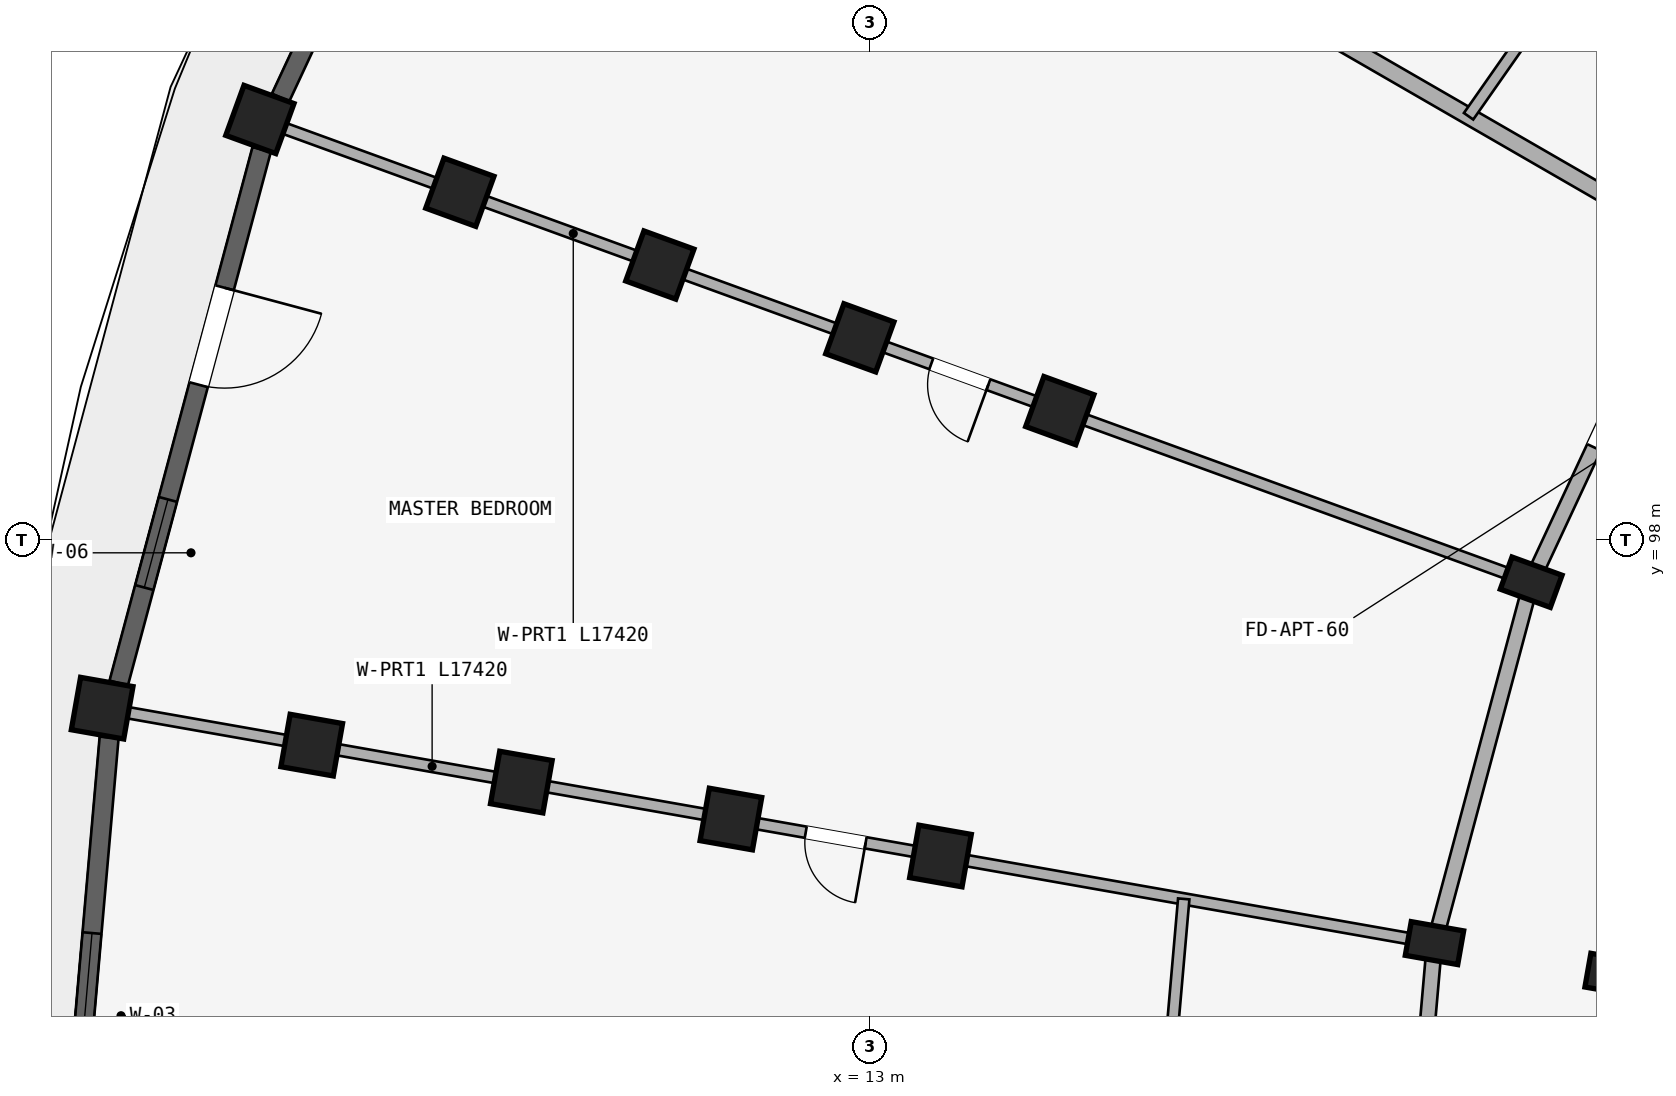
"""IFC4 building model, lengths in metres.
Left out: names, types, materials, properties, quantities, classifications, styles, units other than length and angle.
Written with IfcOpenShell. Run it as: python <this file> out.ifc"""

import sys

from ifc_helpers import new_model, si_unit, direction, frame, frame_2d, origin, origin_2d, place, context, subcontext, project, spatial, rectangle, extrude, element, fill, save


model = new_model("IFC4")
c1 = context("Model", 3, precision=1e-05, world=origin(), true_north=direction((0.0, 1.0)))
c2 = subcontext(c1, "Body", "Model", "MODEL_VIEW")
j1 = project(units=[si_unit("LENGTHUNIT", "METRE"), si_unit("PLANEANGLEUNIT", "RADIAN")], contexts=[c1])
p1 = place(None, origin())
s1 = spatial("IfcSite", under=j1, at=p1, CompositionType="ELEMENT")
p2 = place(p1, origin())
s2 = spatial("IfcBuilding", under=s1, at=p2, CompositionType="ELEMENT")
p3 = place(p2, frame((0.0, 0.0, 24.45)))
s3 = spatial("IfcBuildingStorey", under=s2, at=p3, CompositionType="ELEMENT", Elevation=24.45)
p4 = place(p3, frame((21.701, 97.445, 0.0), z_axis=(0.0, 0.0, 1.0), x_axis=(0.342020143326, 0.939692620786, 0.0)))
e1 = element("IfcColumn", 1, at=p4, inside=s3, PredefinedType="COLUMN", context=c2, shape_type="SweptSolid", body=[
    extrude(rectangle(XDim=0.45, YDim=0.7, at=origin_2d()), origin(), (0.0, 0.0, 1.0), 2.93),
])
for number, where, z_axis, x_axis in (
    (2, (15.499, 99.702, 0.0), (0.0, 0.0, 1.0), (0.342, 0.94, 0.0)),
    (3, (12.868, 100.66, 0.0), (0.0, 0.0, 1.0), (0.342, 0.94, 0.0)),
    (4, (10.236, 101.618, 0.0), (0.0, 0.0, 1.0), (0.342, 0.94, 0.0)),
    (5, (7.605, 102.575, 0.0), (0.0, 0.0, 1.0), (0.342, 0.94, 0.0)),
    (6, (4.974, 103.533, 0.0), (0.0, 0.0, 1.0), (0.342, 0.94, 0.0)),
):
    element("IfcColumn", number, at=place(p3, frame(where, z_axis=z_axis, x_axis=x_axis)), inside=s3, PredefinedType="COLUMN", context=c2, shape_type="SweptSolid", body=[
        extrude(rectangle(XDim=0.7, YDim=0.7, at=origin_2d()), origin(), (0.0, 0.0, 1.0), 2.93),
    ])
for number, where, z_axis, x_axis in (
    (7, (22.792, 92.28, 0.0), (0.0, 0.0, 1.0), (0.174, 0.985, 0.0)),
    (8, (20.428, 92.697, 0.0), (0.0, 0.0, 1.0), (0.174, 0.985, 0.0)),
):
    element("IfcColumn", number, at=place(p3, frame(where, z_axis=z_axis, x_axis=x_axis)), inside=s3, PredefinedType="COLUMN", context=c2, shape_type="SweptSolid", body=[
        extrude(rectangle(XDim=0.45, YDim=0.7, at=origin_2d()), origin(), (0.0, 0.0, 1.0), 2.93),
    ])
for number, where, z_axis, x_axis in (
    (9, (13.929, 93.843, 0.0), (0.0, 0.0, 1.0), (0.174, 0.985, 0.0)),
    (10, (11.171, 94.329, 0.0), (0.0, 0.0, 1.0), (0.174, 0.985, 0.0)),
    (11, (8.414, 94.815, 0.0), (0.0, 0.0, 1.0), (0.174, 0.985, 0.0)),
    (12, (5.656, 95.302, 0.0), (0.0, 0.0, 1.0), (0.174, 0.985, 0.0)),
    (13, (2.899, 95.788, 0.0), (0.0, 0.0, 1.0), (0.174, 0.985, 0.0)),
):
    element("IfcColumn", number, at=place(p3, frame(where, z_axis=z_axis, x_axis=x_axis)), inside=s3, PredefinedType="COLUMN", context=c2, shape_type="SweptSolid", body=[
        extrude(rectangle(XDim=0.7, YDim=0.7, at=origin_2d()), origin(), (0.0, 0.0, 1.0), 2.93),
    ])
p5 = place(p3, frame((23.778, 101.9, 0.0), z_axis=(0.0, 0.0, 1.0), x_axis=(-0.422629854778, -0.906302381024, 0.0)))
e14 = element("IfcWall", 14, at=p5, inside=s3, PredefinedType="STANDARD", context=c2, shape_type="SweptSolid", body=[
    extrude(rectangle(XDim=4.915, YDim=0.2, at=frame_2d((2.458, 0.0))), origin(), (0.0, 0.0, 1.0), 2.372),
])
p6 = place(p5, frame((1.958, 0.0, 0.0)))
e15 = element("IfcOpeningElement", 15, at=p6, cuts=e14, PredefinedType="OPENING", context=c2, shape_type="SweptSolid", body=[
    extrude(rectangle(XDim=1.0, YDim=2.15, at=frame_2d((0.5, 1.075))), frame((0.0, 0.11, 0.0), z_axis=(0.0, -1.0, 0.0), x_axis=(1.0, 0.0, 0.0)), (0.0, 0.0, 1.0), 0.22),
])
p7 = place(p3, frame((21.701, 97.445, 0.0), z_axis=(0.0, 0.0, 1.0), x_axis=(-0.258803112091, -0.965930095386, 0.0)))
e16 = element("IfcWall", 16, at=p7, inside=s3, PredefinedType="STANDARD", context=c2, shape_type="SweptSolid", body=[
    extrude(rectangle(XDim=4.916, YDim=0.2, at=frame_2d((2.458, 0.0))), origin(), (0.0, 0.0, 1.0), 2.372),
])
p8 = place(p3, frame((22.792, 92.28, 0.0), z_axis=(0.0, 0.0, 1.0), x_axis=(-0.087187153726, -0.996191949488, 0.0)))
e17 = element("IfcWall", 17, at=p8, inside=s3, PredefinedType="STANDARD", context=c2, shape_type="SweptSolid", body=[
    extrude(rectangle(XDim=4.497, YDim=0.2, at=frame_2d((2.249, 0.0))), origin(), (0.0, 0.0, 1.0), 2.372),
])
p9 = place(p3, frame((20.428, 92.697, 0.0), z_axis=(0.0, 0.0, 1.0), x_axis=(-0.087167566415, -0.996193663584, 0.0)))
e18 = element("IfcWall", 18, at=p9, inside=s3, PredefinedType="STANDARD", context=c2, shape_type="SweptSolid", body=[
    extrude(rectangle(XDim=4.916, YDim=0.2, at=frame_2d((2.458, 0.0))), origin(), (0.0, 0.0, 1.0), 2.372),
])
p10 = place(p3, frame((23.691, 101.95, 0.0), z_axis=(0.0, 0.0, 1.0), x_axis=(-0.866026648973, 0.499997843263, 0.0)))
e19 = element("IfcWall", 19, at=p10, inside=s3, PredefinedType="STANDARD", context=c2, shape_type="SweptSolid", body=[
    extrude(rectangle(XDim=17.42, YDim=0.22, at=frame_2d((8.71, 0.0))), origin(), (0.0, 0.0, 1.0), 2.372),
])
p11 = place(p3, frame((21.607, 97.479, 0.0), z_axis=(0.0, 0.0, 1.0), x_axis=(-0.939691901159, 0.342022120477, 0.0)))
e20 = element("IfcWall", 20, at=p11, inside=s3, PredefinedType="PARTITIONING", context=c2, shape_type="SweptSolid", body=[
    extrude(rectangle(XDim=17.42, YDim=0.15, at=frame_2d((8.71, 0.0))), origin(), (0.0, 0.0, 1.0), 2.372),
])
p12 = place(p11, frame((7.5, 0.0, 0.0)))
e21 = element("IfcOpeningElement", 21, at=p12, cuts=e20, PredefinedType="OPENING", context=c2, shape_type="SweptSolid", body=[
    extrude(rectangle(XDim=0.8, YDim=2.1, at=frame_2d((0.4, 1.05))), frame((0.0, 0.085, 0.0), z_axis=(0.0, -1.0, 0.0), x_axis=(1.0, 0.0, 0.0)), (0.0, 0.0, 1.0), 0.17),
])
p13 = place(p3, frame((20.33, 92.714, 0.0), z_axis=(0.0, 0.0, 1.0), x_axis=(-0.984808098809, 0.173646216546, 0.0)))
e22 = element("IfcWall", 22, at=p13, inside=s3, PredefinedType="PARTITIONING", context=c2, shape_type="SweptSolid", body=[
    extrude(rectangle(XDim=17.42, YDim=0.15, at=frame_2d((8.71, 0.0))), origin(), (0.0, 0.0, 1.0), 2.372),
])
p14 = place(p13, frame((7.5, 0.0, 0.0)))
e23 = element("IfcOpeningElement", 23, at=p14, cuts=e22, PredefinedType="OPENING", context=c2, shape_type="SweptSolid", body=[
    extrude(rectangle(XDim=0.8, YDim=2.1, at=frame_2d((0.4, 1.05))), frame((0.0, 0.085, 0.0), z_axis=(0.0, -1.0, 0.0), x_axis=(1.0, 0.0, 0.0)), (0.0, 0.0, 1.0), 0.17),
])
p15 = place(p3, frame((24.031, 108.08, 0.0), z_axis=(0.0, 0.0, 1.0), x_axis=(-0.573569599955, -0.819156831143, 0.0)))
e24 = element("IfcWall", 24, at=p15, inside=s3, PredefinedType="PLUMBINGWALL", context=c2, shape_type="SweptSolid", body=[
    extrude(rectangle(XDim=5.5, YDim=0.15, at=frame_2d((2.75, 0.0))), origin(), (0.0, 0.0, 1.0), 2.372),
])
p16 = place(p15, frame((2.35, 0.0, 0.0)))
e25 = element("IfcOpeningElement", 25, at=p16, cuts=e24, PredefinedType="OPENING", context=c2, shape_type="SweptSolid", body=[
    extrude(rectangle(XDim=0.8, YDim=2.1, at=frame_2d((0.4, 1.05))), frame((0.0, 0.085, 0.0), z_axis=(0.0, -1.0, 0.0), x_axis=(1.0, 0.0, 0.0)), (0.0, 0.0, 1.0), 0.17),
])
p17 = place(p3, frame((17.129, 93.279, 0.0), z_axis=(0.0, 0.0, 1.0), x_axis=(-0.087188978393, -0.996191789791, 0.0)))
e26 = element("IfcWall", 26, at=p17, inside=s3, PredefinedType="PLUMBINGWALL", context=c2, shape_type="SweptSolid", body=[
    extrude(rectangle(XDim=5.5, YDim=0.15, at=frame_2d((2.75, 0.0))), origin(), (0.0, 0.0, 1.0), 2.372),
])
p18 = place(p17, frame((2.35, 0.0, 0.0)))
e27 = element("IfcOpeningElement", 27, at=p18, cuts=e26, PredefinedType="OPENING", context=c2, shape_type="SweptSolid", body=[
    extrude(rectangle(XDim=0.8, YDim=2.1, at=frame_2d((0.4, 1.05))), frame((0.0, 0.085, 0.0), z_axis=(0.0, -1.0, 0.0), x_axis=(1.0, 0.0, 0.0)), (0.0, 0.0, 1.0), 0.17),
])
p19 = place(p3, frame((8.317, 110.406, 0.0), z_axis=(0.0, 0.0, 1.0), x_axis=(-0.422627946127, -0.90630327107, 0.0)))
e28 = element("IfcWall", 28, at=p19, inside=s3, PredefinedType="STANDARD", context=c2, shape_type="SweptSolid", body=[
    extrude(rectangle(XDim=7.267, YDim=0.25, at=frame_2d((3.633, 0.0))), origin(), (0.0, 0.0, 1.0), 2.372),
])
p20 = place(p19, frame((2.808, 0.0, 0.422)))
e29 = element("IfcOpeningElement", 29, at=p20, cuts=e28, PredefinedType="OPENING", context=c2, shape_type="SweptSolid", body=[
    extrude(rectangle(XDim=1.65, YDim=1.75, at=frame_2d((0.825, 0.875))), frame((0.0, 0.135, 0.0), z_axis=(0.0, -1.0, 0.0), x_axis=(1.0, 0.0, 0.0)), (0.0, 0.0, 1.0), 0.27),
])
p21 = place(p3, frame((4.998, 103.137, 0.0), z_axis=(0.0, 0.0, 1.0), x_axis=(-0.258802140196, -0.965930355787, 0.0)))
e30 = element("IfcWall", 30, at=p21, inside=s3, PredefinedType="STANDARD", context=c2, shape_type="SweptSolid", body=[
    extrude(rectangle(XDim=7.267, YDim=0.25, at=frame_2d((3.633, 0.0))), origin(), (0.0, 0.0, 1.0), 2.372),
])
p22 = place(p21, frame((4.766, 0.0, 0.522)))
e31 = element("IfcOpeningElement", 31, at=p22, cuts=e30, PredefinedType="OPENING", context=c2, shape_type="SweptSolid", body=[
    extrude(rectangle(XDim=1.2, YDim=1.5, at=frame_2d((0.6, 0.75))), frame((0.0, 0.135, 0.0), z_axis=(0.0, -1.0, 0.0), x_axis=(1.0, 0.0, 0.0)), (0.0, 0.0, 1.0), 0.27),
])
p23 = place(p21, frame((1.883, 0.0, 0.0)))
e32 = element("IfcOpeningElement", 32, at=p23, cuts=e30, PredefinedType="OPENING", context=c2, shape_type="SweptSolid", body=[
    extrude(rectangle(XDim=1.32, YDim=2.15, at=frame_2d((0.66, 1.075))), frame((0.0, 0.135, 0.0), z_axis=(0.0, -1.0, 0.0), x_axis=(1.0, 0.0, 0.0)), (0.0, 0.0, 1.0), 0.27),
])
p24 = place(p3, frame((2.991, 95.403, 0.0), z_axis=(0.0, 0.0, 1.0), x_axis=(-0.08718487158, -0.99619214922, 0.0)))
e33 = element("IfcWall", 33, at=p24, inside=s3, PredefinedType="STANDARD", context=c2, shape_type="SweptSolid", body=[
    extrude(rectangle(XDim=7.267, YDim=0.25, at=frame_2d((3.633, 0.0))), origin(), (0.0, 0.0, 1.0), 2.372),
])
p25 = place(p24, frame((2.583, 0.0, 0.372)))
e34 = element("IfcOpeningElement", 34, at=p25, cuts=e33, PredefinedType="OPENING", context=c2, shape_type="SweptSolid", body=[
    extrude(rectangle(XDim=2.1, YDim=1.8, at=frame_2d((1.05, 0.9))), frame((0.0, 0.135, 0.0), z_axis=(0.0, -1.0, 0.0), x_axis=(1.0, 0.0, 0.0)), (0.0, 0.0, 1.0), 0.27),
])
p26 = place(p22, origin())
e35 = element("IfcWindow", 35, at=p26, inside=s3, PartitioningType="SINGLE_PANEL", PredefinedType="WINDOW", context=c2, shape_type="SweptSolid", body=[
    extrude(rectangle(XDim=1.2, YDim=1.5, at=frame_2d((0.6, 0.75))), frame((0.0, 0.03, 0.0), z_axis=(0.0, -1.0, 0.0), x_axis=(1.0, 0.0, 0.0)), (0.0, 0.0, 1.0), 0.06),
])
fill(e31, e35)
p27 = place(p25, origin())
e36 = element("IfcWindow", 36, at=p27, inside=s3, PartitioningType="TRIPLE_PANEL_VERTICAL", PredefinedType="WINDOW", context=c2, shape_type="SweptSolid", body=[
    extrude(rectangle(XDim=2.1, YDim=1.8, at=frame_2d((1.05, 0.9))), frame((0.0, 0.03, 0.0), z_axis=(0.0, -1.0, 0.0), x_axis=(1.0, 0.0, 0.0)), (0.0, 0.0, 1.0), 0.06),
])
fill(e34, e36)
p28 = place(p12, origin())
e37 = element("IfcDoor", 37, at=p28, inside=s3, OperationType="SINGLE_SWING_LEFT", PredefinedType="DOOR", context=c2, shape_type="SweptSolid", body=[
    extrude(rectangle(XDim=0.8, YDim=2.1, at=frame_2d((0.4, 1.05))), frame((0.0, 0.025, 0.0), z_axis=(0.0, -1.0, 0.0), x_axis=(1.0, 0.0, 0.0)), (0.0, 0.0, 1.0), 0.05),
])
fill(e21, e37)
p29 = place(p14, origin())
e38 = element("IfcDoor", 38, at=p29, inside=s3, OperationType="SINGLE_SWING_LEFT", PredefinedType="DOOR", context=c2, shape_type="SweptSolid", body=[
    extrude(rectangle(XDim=0.8, YDim=2.1, at=frame_2d((0.4, 1.05))), frame((0.0, 0.025, 0.0), z_axis=(0.0, -1.0, 0.0), x_axis=(1.0, 0.0, 0.0)), (0.0, 0.0, 1.0), 0.05),
])
fill(e23, e38)
p30 = place(p6, frame((1.0, 0.0, 0.0), z_axis=(0.0, 0.0, 1.0), x_axis=(-1.0, 0.0, 0.0)))
e39 = element("IfcDoor", 39, at=p30, inside=s3, OperationType="SINGLE_SWING_RIGHT", PredefinedType="DOOR", context=c2, shape_type="SweptSolid", body=[
    extrude(rectangle(XDim=1.0, YDim=2.15, at=frame_2d((0.5, 1.075))), frame((0.0, 0.025, 0.0), z_axis=(0.0, -1.0, 0.0), x_axis=(1.0, 0.0, 0.0)), (0.0, 0.0, 1.0), 0.05),
])
fill(e15, e39)
p31 = place(p23, frame((1.32, 0.0, 0.0), z_axis=(0.0, 0.0, 1.0), x_axis=(-1.0, 0.0, 0.0)))
e40 = element("IfcDoor", 40, at=p31, inside=s3, OperationType="SINGLE_SWING_RIGHT", PredefinedType="DOOR", context=c2, shape_type="SweptSolid", body=[
    extrude(rectangle(XDim=1.32, YDim=2.15, at=frame_2d((0.66, 1.075))), frame((0.0, 0.025, 0.0), z_axis=(0.0, -1.0, 0.0), x_axis=(1.0, 0.0, 0.0)), (0.0, 0.0, 1.0), 0.05),
])
fill(e32, e40)
save(model, sys.argv[1])
